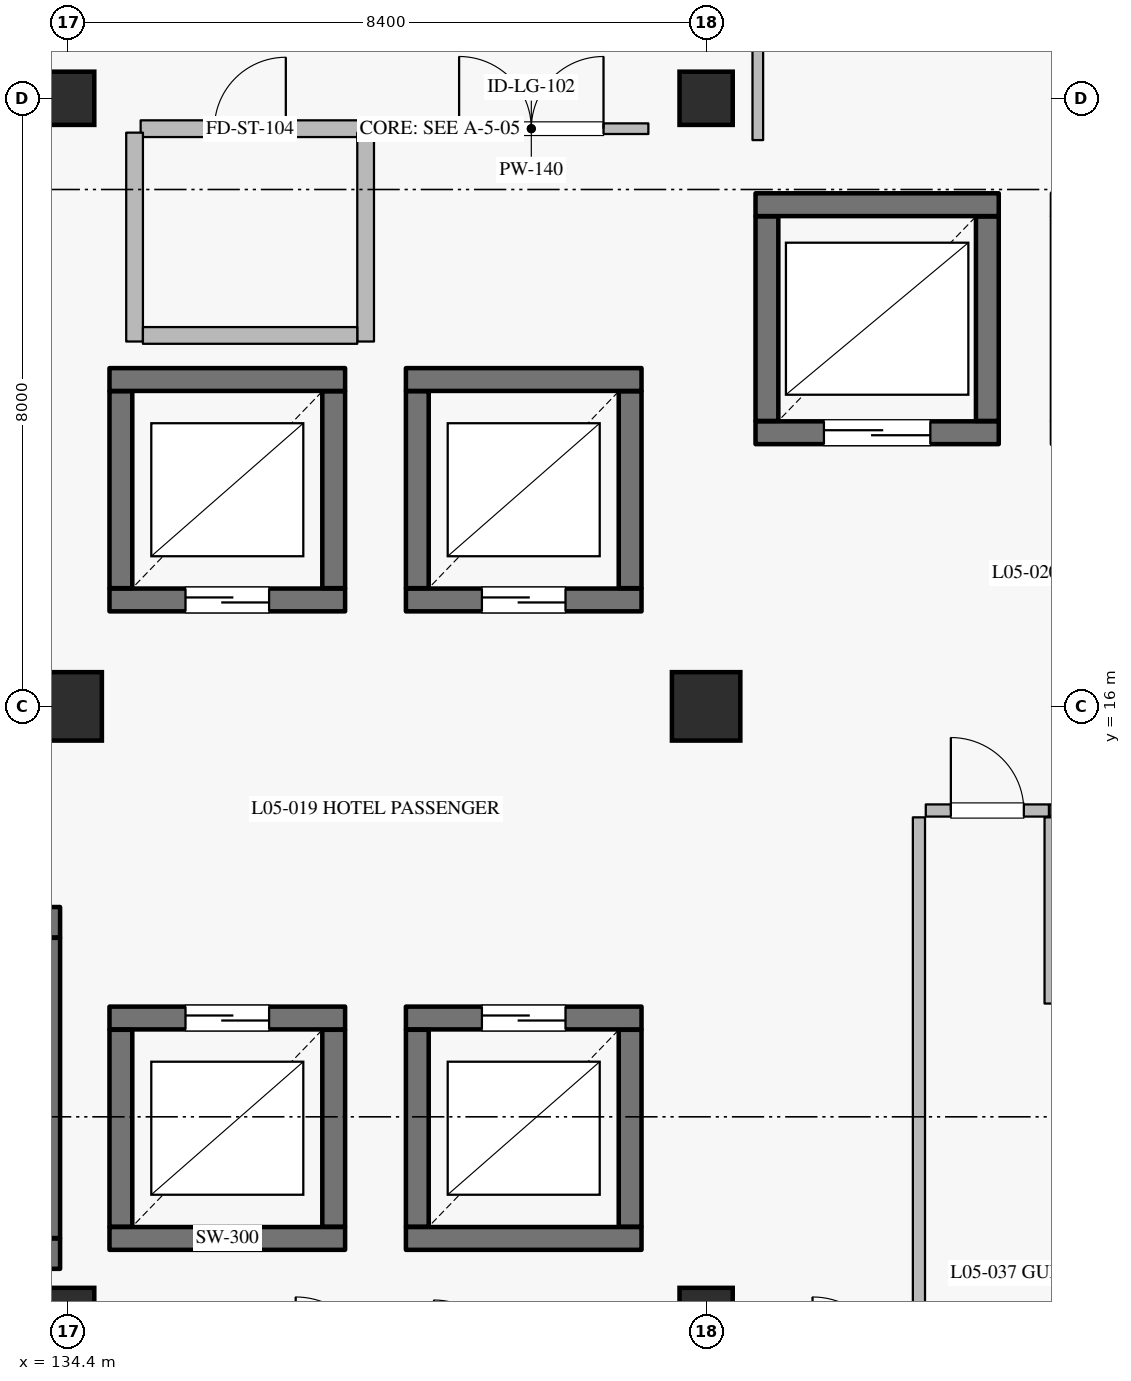
"""IFC4 building model, lengths in metres.
Left out: names, types, materials, properties, quantities, classifications, styles, units other than length and angle.
Written with IfcOpenShell. Run it as: python <this file> out.ifc"""

import sys

from ifc_helpers import new_model, si_unit, direction, frame, frame_2d, origin, origin_2d, place, context, subcontext, project, spatial, rectangle, extrude, element, fill, save


model = new_model("IFC4")
c1 = context("Model", 3, precision=1e-05, world=origin(), true_north=direction((0.0, 1.0)))
c2 = subcontext(c1, "Body", "Model", "MODEL_VIEW")
j1 = project(units=[si_unit("LENGTHUNIT", "METRE"), si_unit("PLANEANGLEUNIT", "RADIAN")], contexts=[c1])
p1 = place(None, origin())
s1 = spatial("IfcSite", under=j1, at=p1, CompositionType="ELEMENT")
p2 = place(p1, origin())
s2 = spatial("IfcBuilding", under=s1, at=p2, CompositionType="ELEMENT")
p3 = place(p2, frame((0.0, 0.0, 25.2)))
s3 = spatial("IfcBuildingStorey", under=s2, at=p3, CompositionType="ELEMENT", Elevation=25.2)
for number, where, z_axis, x_axis in (
    (1, (134.4, 16.0, 0.0), (0.0, 0.0, 1.0), (1.0, 0.0, 0.0)),
    (2, (142.8, 16.0, 0.0), (0.0, 0.0, 1.0), (1.0, 0.0, 0.0)),
):
    element("IfcColumn", number, at=place(p3, frame(where, z_axis=z_axis, x_axis=x_axis)), inside=s3, PredefinedType="COLUMN", context=c2, shape_type="SweptSolid", body=[
        extrude(rectangle(XDim=0.9, YDim=0.9, at=origin_2d()), origin(), (0.0, 0.0, 1.0), 3.6),
    ])
for number, where, z_axis, x_axis in (
    (3, (134.4, 8.0, 0.0), (0.0, 0.0, 1.0), (1.0, 0.0, 0.0)),
    (4, (134.4, 24.0, 0.0), (0.0, 0.0, 1.0), (1.0, 0.0, 0.0)),
    (5, (142.8, 8.0, 0.0), (0.0, 0.0, 1.0), (1.0, 0.0, 0.0)),
    (6, (142.8, 24.0, 0.0), (0.0, 0.0, 1.0), (1.0, 0.0, 0.0)),
):
    element("IfcColumn", number, at=place(p3, frame(where, z_axis=z_axis, x_axis=x_axis)), inside=s3, PredefinedType="COLUMN", context=c2, shape_type="SweptSolid", body=[
        extrude(rectangle(XDim=0.7, YDim=0.7, at=origin_2d()), origin(), (0.0, 0.0, 1.0), 3.6),
    ])
p4 = place(p3, frame((134.95, 17.4, 0.0), z_axis=(0.0, 0.0, 1.0), x_axis=(1.0, 0.0, 0.0)))
e7 = element("IfcWall", 7, at=p4, inside=s3, PredefinedType="SHEAR", context=c2, shape_type="SweptSolid", body=[
    extrude(rectangle(XDim=3.1, YDim=0.3, at=frame_2d((1.55, 0.0))), origin(), (0.0, 0.0, 1.0), 3.335),
])
p5 = place(p4, frame((1.0, 0.0, 0.0)))
e8 = element("IfcOpeningElement", 8, at=p5, cuts=e7, PredefinedType="OPENING", context=c2, shape_type="SweptSolid", body=[
    extrude(rectangle(XDim=1.1, YDim=2.2, at=frame_2d((0.55, 1.1))), frame((0.0, 0.16, 0.0), z_axis=(0.0, -1.0, 0.0), x_axis=(1.0, 0.0, 0.0)), (0.0, 0.0, 1.0), 0.32),
])
p6 = place(p3, frame((137.9, 17.555, 0.0), z_axis=(0.0, 0.0, 1.0), x_axis=(0.0, 1.0, 0.0)))
e9 = element("IfcWall", 9, at=p6, inside=s3, PredefinedType="SHEAR", context=c2, shape_type="SweptSolid", body=[
    extrude(rectangle(XDim=2.59, YDim=0.3, at=frame_2d((1.295, 0.0))), origin(), (0.0, 0.0, 1.0), 3.335),
])
p7 = place(p3, frame((138.05, 20.3, 0.0), z_axis=(0.0, 0.0, 1.0), x_axis=(-1.0, 0.0, 0.0)))
e10 = element("IfcWall", 10, at=p7, inside=s3, PredefinedType="SHEAR", context=c2, shape_type="SweptSolid", body=[
    extrude(rectangle(XDim=3.1, YDim=0.3, at=frame_2d((1.55, 0.0))), origin(), (0.0, 0.0, 1.0), 3.335),
])
p8 = place(p3, frame((135.1, 20.145, 0.0), z_axis=(0.0, 0.0, 1.0), x_axis=(0.0, -1.0, 0.0)))
e11 = element("IfcWall", 11, at=p8, inside=s3, PredefinedType="SHEAR", context=c2, shape_type="SweptSolid", body=[
    extrude(rectangle(XDim=2.59, YDim=0.3, at=frame_2d((1.295, 0.0))), origin(), (0.0, 0.0, 1.0), 3.335),
])
p9 = place(p3, frame((138.85, 17.4, 0.0), z_axis=(0.0, 0.0, 1.0), x_axis=(1.0, 0.0, 0.0)))
e12 = element("IfcWall", 12, at=p9, inside=s3, PredefinedType="SHEAR", context=c2, shape_type="SweptSolid", body=[
    extrude(rectangle(XDim=3.1, YDim=0.3, at=frame_2d((1.55, 0.0))), origin(), (0.0, 0.0, 1.0), 3.335),
])
p10 = place(p9, frame((1.0, 0.0, 0.0)))
e13 = element("IfcOpeningElement", 13, at=p10, cuts=e12, PredefinedType="OPENING", context=c2, shape_type="SweptSolid", body=[
    extrude(rectangle(XDim=1.1, YDim=2.2, at=frame_2d((0.55, 1.1))), frame((0.0, 0.16, 0.0), z_axis=(0.0, -1.0, 0.0), x_axis=(1.0, 0.0, 0.0)), (0.0, 0.0, 1.0), 0.32),
])
p11 = place(p3, frame((141.8, 17.555, 0.0), z_axis=(0.0, 0.0, 1.0), x_axis=(0.0, 1.0, 0.0)))
e14 = element("IfcWall", 14, at=p11, inside=s3, PredefinedType="SHEAR", context=c2, shape_type="SweptSolid", body=[
    extrude(rectangle(XDim=2.59, YDim=0.3, at=frame_2d((1.295, 0.0))), origin(), (0.0, 0.0, 1.0), 3.335),
])
p12 = place(p3, frame((141.95, 20.3, 0.0), z_axis=(0.0, 0.0, 1.0), x_axis=(-1.0, 0.0, 0.0)))
e15 = element("IfcWall", 15, at=p12, inside=s3, PredefinedType="SHEAR", context=c2, shape_type="SweptSolid", body=[
    extrude(rectangle(XDim=3.1, YDim=0.3, at=frame_2d((1.55, 0.0))), origin(), (0.0, 0.0, 1.0), 3.335),
])
p13 = place(p3, frame((139.0, 20.145, 0.0), z_axis=(0.0, 0.0, 1.0), x_axis=(0.0, -1.0, 0.0)))
e16 = element("IfcWall", 16, at=p13, inside=s3, PredefinedType="SHEAR", context=c2, shape_type="SweptSolid", body=[
    extrude(rectangle(XDim=2.59, YDim=0.3, at=frame_2d((1.295, 0.0))), origin(), (0.0, 0.0, 1.0), 3.335),
])
p14 = place(p3, frame((134.95, 9.0, 0.0), z_axis=(0.0, 0.0, 1.0), x_axis=(1.0, 0.0, 0.0)))
e17 = element("IfcWall", 17, at=p14, inside=s3, PredefinedType="SHEAR", context=c2, shape_type="SweptSolid", body=[
    extrude(rectangle(XDim=3.1, YDim=0.3, at=frame_2d((1.55, 0.0))), origin(), (0.0, 0.0, 1.0), 3.335),
])
p15 = place(p3, frame((137.9, 9.155, 0.0), z_axis=(0.0, 0.0, 1.0), x_axis=(0.0, 1.0, 0.0)))
e18 = element("IfcWall", 18, at=p15, inside=s3, PredefinedType="SHEAR", context=c2, shape_type="SweptSolid", body=[
    extrude(rectangle(XDim=2.59, YDim=0.3, at=frame_2d((1.295, 0.0))), origin(), (0.0, 0.0, 1.0), 3.335),
])
p16 = place(p3, frame((138.05, 11.9, 0.0), z_axis=(0.0, 0.0, 1.0), x_axis=(-1.0, 0.0, 0.0)))
e19 = element("IfcWall", 19, at=p16, inside=s3, PredefinedType="SHEAR", context=c2, shape_type="SweptSolid", body=[
    extrude(rectangle(XDim=3.1, YDim=0.3, at=frame_2d((1.55, 0.0))), origin(), (0.0, 0.0, 1.0), 3.335),
])
p17 = place(p16, frame((1.0, 0.0, 0.0)))
e20 = element("IfcOpeningElement", 20, at=p17, cuts=e19, PredefinedType="OPENING", context=c2, shape_type="SweptSolid", body=[
    extrude(rectangle(XDim=1.1, YDim=2.2, at=frame_2d((0.55, 1.1))), frame((0.0, 0.16, 0.0), z_axis=(0.0, -1.0, 0.0), x_axis=(1.0, 0.0, 0.0)), (0.0, 0.0, 1.0), 0.32),
])
p18 = place(p3, frame((135.1, 11.745, 0.0), z_axis=(0.0, 0.0, 1.0), x_axis=(0.0, -1.0, 0.0)))
e21 = element("IfcWall", 21, at=p18, inside=s3, PredefinedType="SHEAR", context=c2, shape_type="SweptSolid", body=[
    extrude(rectangle(XDim=2.59, YDim=0.3, at=frame_2d((1.295, 0.0))), origin(), (0.0, 0.0, 1.0), 3.335),
])
p19 = place(p3, frame((138.85, 9.0, 0.0), z_axis=(0.0, 0.0, 1.0), x_axis=(1.0, 0.0, 0.0)))
e22 = element("IfcWall", 22, at=p19, inside=s3, PredefinedType="SHEAR", context=c2, shape_type="SweptSolid", body=[
    extrude(rectangle(XDim=3.1, YDim=0.3, at=frame_2d((1.55, 0.0))), origin(), (0.0, 0.0, 1.0), 3.335),
])
p20 = place(p3, frame((141.8, 9.155, 0.0), z_axis=(0.0, 0.0, 1.0), x_axis=(0.0, 1.0, 0.0)))
e23 = element("IfcWall", 23, at=p20, inside=s3, PredefinedType="SHEAR", context=c2, shape_type="SweptSolid", body=[
    extrude(rectangle(XDim=2.59, YDim=0.3, at=frame_2d((1.295, 0.0))), origin(), (0.0, 0.0, 1.0), 3.335),
])
p21 = place(p3, frame((141.95, 11.9, 0.0), z_axis=(0.0, 0.0, 1.0), x_axis=(-1.0, 0.0, 0.0)))
e24 = element("IfcWall", 24, at=p21, inside=s3, PredefinedType="SHEAR", context=c2, shape_type="SweptSolid", body=[
    extrude(rectangle(XDim=3.1, YDim=0.3, at=frame_2d((1.55, 0.0))), origin(), (0.0, 0.0, 1.0), 3.335),
])
p22 = place(p21, frame((1.0, 0.0, 0.0)))
e25 = element("IfcOpeningElement", 25, at=p22, cuts=e24, PredefinedType="OPENING", context=c2, shape_type="SweptSolid", body=[
    extrude(rectangle(XDim=1.1, YDim=2.2, at=frame_2d((0.55, 1.1))), frame((0.0, 0.16, 0.0), z_axis=(0.0, -1.0, 0.0), x_axis=(1.0, 0.0, 0.0)), (0.0, 0.0, 1.0), 0.32),
])
p23 = place(p3, frame((139.0, 11.745, 0.0), z_axis=(0.0, 0.0, 1.0), x_axis=(0.0, -1.0, 0.0)))
e26 = element("IfcWall", 26, at=p23, inside=s3, PredefinedType="SHEAR", context=c2, shape_type="SweptSolid", body=[
    extrude(rectangle(XDim=2.59, YDim=0.3, at=frame_2d((1.295, 0.0))), origin(), (0.0, 0.0, 1.0), 3.335),
])
p24 = place(p3, frame((143.45, 19.6, 0.0), z_axis=(0.0, 0.0, 1.0), x_axis=(1.0, 0.0, 0.0)))
e27 = element("IfcWall", 27, at=p24, inside=s3, PredefinedType="SHEAR", context=c2, shape_type="SweptSolid", body=[
    extrude(rectangle(XDim=3.2, YDim=0.3, at=frame_2d((1.6, 0.0))), origin(), (0.0, 0.0, 1.0), 3.335),
])
p25 = place(p24, frame((0.9, 0.0, 0.0)))
e28 = element("IfcOpeningElement", 28, at=p25, cuts=e27, PredefinedType="OPENING", context=c2, shape_type="SweptSolid", body=[
    extrude(rectangle(XDim=1.4, YDim=2.35, at=frame_2d((0.7, 1.175))), frame((0.0, 0.16, 0.0), z_axis=(0.0, -1.0, 0.0), x_axis=(1.0, 0.0, 0.0)), (0.0, 0.0, 1.0), 0.32),
])
p26 = place(p3, frame((146.5, 19.755, 0.0), z_axis=(0.0, 0.0, 1.0), x_axis=(0.0, 1.0, 0.0)))
e29 = element("IfcWall", 29, at=p26, inside=s3, PredefinedType="SHEAR", context=c2, shape_type="SweptSolid", body=[
    extrude(rectangle(XDim=2.69, YDim=0.3, at=frame_2d((1.345, 0.0))), origin(), (0.0, 0.0, 1.0), 3.335),
])
p27 = place(p3, frame((146.65, 22.6, 0.0), z_axis=(0.0, 0.0, 1.0), x_axis=(-1.0, 0.0, 0.0)))
e30 = element("IfcWall", 30, at=p27, inside=s3, PredefinedType="SHEAR", context=c2, shape_type="SweptSolid", body=[
    extrude(rectangle(XDim=3.2, YDim=0.3, at=frame_2d((1.6, 0.0))), origin(), (0.0, 0.0, 1.0), 3.335),
])
p28 = place(p3, frame((143.6, 22.445, 0.0), z_axis=(0.0, 0.0, 1.0), x_axis=(0.0, -1.0, 0.0)))
e31 = element("IfcWall", 31, at=p28, inside=s3, PredefinedType="SHEAR", context=c2, shape_type="SweptSolid", body=[
    extrude(rectangle(XDim=2.69, YDim=0.3, at=frame_2d((1.345, 0.0))), origin(), (0.0, 0.0, 1.0), 3.335),
])
p29 = place(p3, frame((126.1, 8.8, 0.0), z_axis=(0.0, 0.0, 1.0), x_axis=(1.0, 0.0, 0.0)))
e32 = element("IfcWall", 32, at=p29, inside=s3, PredefinedType="SHEAR", context=c2, shape_type="SweptSolid", body=[
    extrude(rectangle(XDim=8.2, YDim=0.4, at=frame_2d((4.1, 0.0))), origin(), (0.0, 0.0, 1.0), 3.335),
])
p30 = place(p3, frame((134.1, 9.005, 0.0), z_axis=(0.0, 0.0, 1.0), x_axis=(0.0, 1.0, 0.0)))
e33 = element("IfcWall", 33, at=p30, inside=s3, PredefinedType="SHEAR", context=c2, shape_type="SweptSolid", body=[
    extrude(rectangle(XDim=3.95, YDim=0.4, at=frame_2d((1.975, 0.0))), origin(), (0.0, 0.0, 1.0), 3.335),
])
p31 = place(p3, frame((126.1, 13.16, 0.0), z_axis=(0.0, 0.0, 1.0), x_axis=(1.0, 0.0, 0.0)))
e34 = element("IfcWall", 34, at=p31, inside=s3, PredefinedType="SHEAR", context=c2, shape_type="SweptSolid", body=[
    extrude(rectangle(XDim=8.2, YDim=0.4, at=frame_2d((4.1, 0.0))), origin(), (0.0, 0.0, 1.0), 3.335),
])
p32 = place(p31, frame((0.43, 0.0, 0.0)))
e35 = element("IfcOpeningElement", 35, at=p32, cuts=e34, PredefinedType="OPENING", context=c2, shape_type="SweptSolid", body=[
    extrude(rectangle(XDim=1.16, YDim=2.2, at=frame_2d((0.58, 1.1))), frame((0.0, 0.21, 0.0), z_axis=(0.0, -1.0, 0.0), x_axis=(1.0, 0.0, 0.0)), (0.0, 0.0, 1.0), 0.42),
])
p33 = place(p3, frame((145.69, 14.63, 0.0), z_axis=(0.0, 0.0, 1.0), x_axis=(1.0, 0.0, 0.0)))
e36 = element("IfcWall", 36, at=p33, inside=s3, PredefinedType="PARTITIONING", context=c2, shape_type="SweptSolid", body=[
    extrude(rectangle(XDim=1.62, YDim=0.16, at=frame_2d((0.81, 0.0))), origin(), (0.0, 0.0, 1.0), 3.335),
])
p34 = place(p33, frame((0.33, 0.0, 0.0)))
e37 = element("IfcOpeningElement", 37, at=p34, cuts=e36, PredefinedType="OPENING", context=c2, shape_type="SweptSolid", body=[
    extrude(rectangle(XDim=0.96, YDim=2.2, at=frame_2d((0.48, 1.1))), frame((0.0, 0.09, 0.0), z_axis=(0.0, -1.0, 0.0), x_axis=(1.0, 0.0, 0.0)), (0.0, 0.0, 1.0), 0.18),
])
p35 = place(p3, frame((147.32, 14.63, 0.0), z_axis=(0.0, 0.0, 1.0), x_axis=(1.0, 0.0, 0.0)))
e38 = element("IfcWall", 38, at=p35, inside=s3, PredefinedType="PARTITIONING", context=c2, shape_type="SweptSolid", body=[
    extrude(rectangle(XDim=1.59, YDim=0.16, at=frame_2d((0.795, 0.0))), origin(), (0.0, 0.0, 1.0), 3.335),
])
p36 = place(p3, frame((147.31, 12.09, 0.0), z_axis=(0.0, 0.0, 1.0), x_axis=(0.0, 1.0, 0.0)))
e39 = element("IfcWall", 39, at=p36, inside=s3, PredefinedType="PARTITIONING", context=c2, shape_type="SweptSolid", body=[
    extrude(rectangle(XDim=2.45, YDim=0.115, at=frame_2d((1.225, 0.0))), origin(), (0.0, 0.0, 1.0), 3.335),
])
p37 = place(p3, frame((145.6, 6.24, 0.0), z_axis=(0.0, 0.0, 1.0), x_axis=(0.0, 1.0, 0.0)))
e40 = element("IfcWall", 40, at=p37, inside=s3, PredefinedType="PARTITIONING", context=c2, shape_type="SweptSolid", body=[
    extrude(rectangle(XDim=8.3, YDim=0.16, at=frame_2d((4.15, 0.0))), origin(), (0.0, 0.0, 1.0), 3.335),
])
p38 = place(p3, frame((138.96, 23.6, 0.0), z_axis=(0.0, 0.0, 1.0), x_axis=(1.0, 0.0, 0.0)))
e41 = element("IfcWall", 41, at=p38, inside=s3, PredefinedType="PARTITIONING", context=c2, shape_type="SweptSolid", body=[
    extrude(rectangle(XDim=3.08, YDim=0.14, at=frame_2d((1.54, 0.0))), origin(), (0.0, 0.0, 1.0), 3.335),
])
p39 = place(p38, frame((0.59, 0.0, 0.0)))
e42 = element("IfcOpeningElement", 42, at=p39, cuts=e41, PredefinedType="OPENING", context=c2, shape_type="SweptSolid", body=[
    extrude(rectangle(XDim=1.9, YDim=2.4, at=frame_2d((0.95, 1.2))), frame((0.0, 0.08, 0.0), z_axis=(0.0, -1.0, 0.0), x_axis=(1.0, 0.0, 0.0)), (0.0, 0.0, 1.0), 0.16),
])
p40 = place(p3, frame((135.36, 23.6, 0.0), z_axis=(0.0, 0.0, 1.0), x_axis=(1.0, 0.0, 0.0)))
e43 = element("IfcWall", 43, at=p40, inside=s3, PredefinedType="PARTITIONING", context=c2, shape_type="SweptSolid", body=[
    extrude(rectangle(XDim=2.88, YDim=0.22, at=frame_2d((1.44, 0.0))), origin(), (0.0, 0.0, 1.0), 3.335),
])
p41 = place(p40, frame((0.97, 0.0, 0.0)))
e44 = element("IfcOpeningElement", 44, at=p41, cuts=e43, PredefinedType="OPENING", context=c2, shape_type="SweptSolid", body=[
    extrude(rectangle(XDim=0.94, YDim=2.15, at=frame_2d((0.47, 1.075))), frame((0.0, 0.12, 0.0), z_axis=(0.0, -1.0, 0.0), x_axis=(1.0, 0.0, 0.0)), (0.0, 0.0, 1.0), 0.24),
])
p42 = place(p3, frame((143.48, 23.45, 0.0), z_axis=(0.0, 0.0, 1.0), x_axis=(0.0, 1.0, 0.0)))
e45 = element("IfcWall", 45, at=p42, inside=s3, PredefinedType="PARTITIONING", context=c2, shape_type="SweptSolid", body=[
    extrude(rectangle(XDim=3.21, YDim=0.14, at=frame_2d((1.605, 0.0))), origin(), (0.0, 0.0, 1.0), 3.335),
])
for number, where, z_axis, x_axis in (
    (46, (135.28, 20.8, 0.0), (0.0, 0.0, 1.0), (0.0, 1.0, 0.0)),
    (47, (138.32, 20.8, 0.0), (0.0, 0.0, 1.0), (0.0, 1.0, 0.0)),
):
    element("IfcWall", number, at=place(p3, frame(where, z_axis=z_axis, x_axis=x_axis)), inside=s3, PredefinedType="PARTITIONING", context=c2, shape_type="SweptSolid", body=[
        extrude(rectangle(XDim=2.748, YDim=0.22, at=frame_2d((1.374, 0.0))), origin(), (0.0, 0.0, 1.0), 3.335),
    ])
p43 = place(p3, frame((135.39, 20.88, 0.0), z_axis=(0.0, 0.0, 1.0), x_axis=(1.0, 0.0, 0.0)))
e48 = element("IfcWall", 48, at=p43, inside=s3, PredefinedType="PARTITIONING", context=c2, shape_type="SweptSolid", body=[
    extrude(rectangle(XDim=2.82, YDim=0.22, at=frame_2d((1.41, 0.0))), origin(), (0.0, 0.0, 1.0), 3.335),
])
p44 = place(p5, origin())
e49 = element("IfcDoor", 49, at=p44, inside=s3, OperationType="DOUBLE_DOOR_SLIDING", PredefinedType="DOOR", context=c2, shape_type="SweptSolid", body=[
    extrude(rectangle(XDim=1.1, YDim=2.2, at=frame_2d((0.55, 1.1))), frame((0.0, 0.025, 0.0), z_axis=(0.0, -1.0, 0.0), x_axis=(1.0, 0.0, 0.0)), (0.0, 0.0, 1.0), 0.05),
])
fill(e8, e49)
p45 = place(p10, origin())
e50 = element("IfcDoor", 50, at=p45, inside=s3, OperationType="DOUBLE_DOOR_SLIDING", PredefinedType="DOOR", context=c2, shape_type="SweptSolid", body=[
    extrude(rectangle(XDim=1.1, YDim=2.2, at=frame_2d((0.55, 1.1))), frame((0.0, 0.025, 0.0), z_axis=(0.0, -1.0, 0.0), x_axis=(1.0, 0.0, 0.0)), (0.0, 0.0, 1.0), 0.05),
])
fill(e13, e50)
p46 = place(p17, origin())
e51 = element("IfcDoor", 51, at=p46, inside=s3, OperationType="DOUBLE_DOOR_SLIDING", PredefinedType="DOOR", context=c2, shape_type="SweptSolid", body=[
    extrude(rectangle(XDim=1.1, YDim=2.2, at=frame_2d((0.55, 1.1))), frame((0.0, 0.025, 0.0), z_axis=(0.0, -1.0, 0.0), x_axis=(1.0, 0.0, 0.0)), (0.0, 0.0, 1.0), 0.05),
])
fill(e20, e51)
p47 = place(p22, origin())
e52 = element("IfcDoor", 52, at=p47, inside=s3, OperationType="DOUBLE_DOOR_SLIDING", PredefinedType="DOOR", context=c2, shape_type="SweptSolid", body=[
    extrude(rectangle(XDim=1.1, YDim=2.2, at=frame_2d((0.55, 1.1))), frame((0.0, 0.025, 0.0), z_axis=(0.0, -1.0, 0.0), x_axis=(1.0, 0.0, 0.0)), (0.0, 0.0, 1.0), 0.05),
])
fill(e25, e52)
p48 = place(p25, origin())
e53 = element("IfcDoor", 53, at=p48, inside=s3, OperationType="DOUBLE_DOOR_SLIDING", PredefinedType="DOOR", context=c2, shape_type="SweptSolid", body=[
    extrude(rectangle(XDim=1.4, YDim=2.35, at=frame_2d((0.7, 1.175))), frame((0.0, 0.025, 0.0), z_axis=(0.0, -1.0, 0.0), x_axis=(1.0, 0.0, 0.0)), (0.0, 0.0, 1.0), 0.05),
])
fill(e28, e53)
p49 = place(p34, origin())
e54 = element("IfcDoor", 54, at=p49, inside=s3, OperationType="SINGLE_SWING_LEFT", PredefinedType="DOOR", context=c2, shape_type="SweptSolid", body=[
    extrude(rectangle(XDim=0.96, YDim=2.2, at=frame_2d((0.48, 1.1))), frame((0.0, 0.025, 0.0), z_axis=(0.0, -1.0, 0.0), x_axis=(1.0, 0.0, 0.0)), (0.0, 0.0, 1.0), 0.05),
])
fill(e37, e54)
p50 = place(p39, origin())
e55 = element("IfcDoor", 55, at=p50, inside=s3, OperationType="DOUBLE_DOOR_SINGLE_SWING", PredefinedType="DOOR", context=c2, shape_type="SweptSolid", body=[
    extrude(rectangle(XDim=1.9, YDim=2.4, at=frame_2d((0.95, 1.2))), frame((0.0, 0.025, 0.0), z_axis=(0.0, -1.0, 0.0), x_axis=(1.0, 0.0, 0.0)), (0.0, 0.0, 1.0), 0.05),
])
fill(e42, e55)
p51 = place(p41, origin())
e56 = element("IfcDoor", 56, at=p51, inside=s3, OperationType="SINGLE_SWING_RIGHT", PredefinedType="DOOR", context=c2, shape_type="SweptSolid", body=[
    extrude(rectangle(XDim=0.94, YDim=2.15, at=frame_2d((0.47, 1.075))), frame((0.0, 0.025, 0.0), z_axis=(0.0, -1.0, 0.0), x_axis=(1.0, 0.0, 0.0)), (0.0, 0.0, 1.0), 0.05),
])
fill(e44, e56)
save(model, sys.argv[1])
